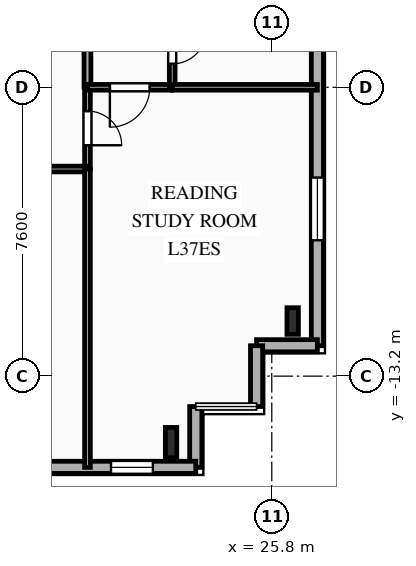
"""IFC4 building model, lengths in metres.
Left out: names, types, materials, properties, quantities, classifications, styles, units other than length and angle.
Written with IfcOpenShell. Run it as: python <this file> out.ifc"""

import sys

from ifc_helpers import new_model, si_unit, direction, frame, frame_2d, origin, origin_2d, place, context, subcontext, project, spatial, rectangle, i_section, extrude, element, fill, save


model = new_model("IFC4")
c1 = context("Model", 3, precision=1e-05, world=origin(), true_north=direction((0.0, 1.0)))
c2 = subcontext(c1, "Body", "Model", "MODEL_VIEW")
j1 = project(units=[si_unit("LENGTHUNIT", "METRE"), si_unit("PLANEANGLEUNIT", "RADIAN")], contexts=[c1])
p1 = place(None, origin())
s1 = spatial("IfcSite", under=j1, at=p1, CompositionType="ELEMENT")
p2 = place(p1, origin())
s2 = spatial("IfcBuilding", under=s1, at=p2, CompositionType="ELEMENT")
p3 = place(p2, frame((0.0, 0.0, 134.35)))
s3 = spatial("IfcBuildingStorey", under=s2, at=p3, CompositionType="ELEMENT", Elevation=134.35)
p4 = place(p3, frame((23.15, -14.95, 0.0), z_axis=(0.0, 0.0, 1.0), x_axis=(1.0, 0.0, 0.0)))
e1 = element("IfcColumn", 1, at=p4, inside=s3, PredefinedType="COLUMN", context=c2, shape_type="SweptSolid", body=[
    extrude(i_section(OverallWidth=0.3, OverallDepth=0.8, WebThickness=0.018, FlangeThickness=0.033, FilletRadius=0.03, at=origin_2d()), origin(), (0.0, 0.0, 1.0), 3.35),
])
p5 = place(p3, frame((26.35, -11.75, 0.0), z_axis=(0.0, 0.0, 1.0), x_axis=(1.0, 0.0, 0.0)))
e2 = element("IfcColumn", 2, at=p5, inside=s3, PredefinedType="COLUMN", context=c2, shape_type="SweptSolid", body=[
    extrude(i_section(OverallWidth=0.3, OverallDepth=0.7, WebThickness=0.017, FlangeThickness=0.032, FilletRadius=0.027, at=origin_2d()), origin(), (0.0, 0.0, 1.0), 3.35),
])
p6 = place(p3, frame((27.0, 17.2, 0.0), z_axis=(0.0, 0.0, 1.0), x_axis=(0.0, -1.0, 0.0)))
e3 = element("IfcWall", 3, at=p6, inside=s3, PredefinedType="SOLIDWALL", context=c2, shape_type="SweptSolid", body=[
    extrude(rectangle(XDim=29.6, YDim=0.32, at=frame_2d((14.8, 0.0))), origin(), (0.0, 0.0, 1.0), 3.04),
])
p7 = place(p6, frame((3.775, 0.0, 0.85)))
e4 = element("IfcOpeningElement", 4, at=p7, cuts=e3, PredefinedType="OPENING", context=c2, shape_type="SweptSolid", body=[
    extrude(rectangle(XDim=1.65, YDim=1.85, at=frame_2d((0.825, 0.925))), frame((0.0, 0.17, 0.0), z_axis=(0.0, -1.0, 0.0), x_axis=(1.0, 0.0, 0.0)), (0.0, 0.0, 1.0), 0.34),
])
p8 = place(p6, frame((9.32, 0.0, 0.85)))
e5 = element("IfcOpeningElement", 5, at=p8, cuts=e3, PredefinedType="OPENING", context=c2, shape_type="SweptSolid", body=[
    extrude(rectangle(XDim=1.6, YDim=1.85, at=frame_2d((0.8, 0.925))), frame((0.0, 0.17, 0.0), z_axis=(0.0, -1.0, 0.0), x_axis=(1.0, 0.0, 0.0)), (0.0, 0.0, 1.0), 0.34),
])
p9 = place(p6, frame((12.2, 0.0, 0.85)))
e6 = element("IfcOpeningElement", 6, at=p9, cuts=e3, PredefinedType="OPENING", context=c2, shape_type="SweptSolid", body=[
    extrude(rectangle(XDim=1.6, YDim=1.85, at=frame_2d((0.8, 0.925))), frame((0.0, 0.17, 0.0), z_axis=(0.0, -1.0, 0.0), x_axis=(1.0, 0.0, 0.0)), (0.0, 0.0, 1.0), 0.34),
])
p10 = place(p6, frame((15.0, 0.0, 0.85)))
e7 = element("IfcOpeningElement", 7, at=p10, cuts=e3, PredefinedType="OPENING", context=c2, shape_type="SweptSolid", body=[
    extrude(rectangle(XDim=1.6, YDim=1.85, at=frame_2d((0.8, 0.925))), frame((0.0, 0.17, 0.0), z_axis=(0.0, -1.0, 0.0), x_axis=(1.0, 0.0, 0.0)), (0.0, 0.0, 1.0), 0.34),
])
p11 = place(p6, frame((17.865, 0.0, 0.85)))
e8 = element("IfcOpeningElement", 8, at=p11, cuts=e3, PredefinedType="OPENING", context=c2, shape_type="SweptSolid", body=[
    extrude(rectangle(XDim=1.95, YDim=1.85, at=frame_2d((0.975, 0.925))), frame((0.0, 0.17, 0.0), z_axis=(0.0, -1.0, 0.0), x_axis=(1.0, 0.0, 0.0)), (0.0, 0.0, 1.0), 0.34),
])
p12 = place(p6, frame((25.175, 0.0, 0.85)))
e9 = element("IfcOpeningElement", 9, at=p12, cuts=e3, PredefinedType="OPENING", context=c2, shape_type="SweptSolid", body=[
    extrude(rectangle(XDim=1.65, YDim=1.85, at=frame_2d((0.825, 0.925))), frame((0.0, 0.17, 0.0), z_axis=(0.0, -1.0, 0.0), x_axis=(1.0, 0.0, 0.0)), (0.0, 0.0, 1.0), 0.34),
])
for number, where, z_axis, x_axis in (
    (10, (27.0, -12.4, 0.0), (0.0, 0.0, 1.0), (-1.0, 0.0, 0.0)),
    (11, (25.4, -12.4, 0.0), (0.0, 0.0, 1.0), (0.0, -1.0, 0.0)),
    (12, (23.8, -14.0, 0.0), (0.0, 0.0, 1.0), (0.0, -1.0, 0.0)),
):
    element("IfcWall", number, at=place(p3, frame(where, z_axis=z_axis, x_axis=x_axis)), inside=s3, PredefinedType="SOLIDWALL", context=c2, shape_type="SweptSolid", body=[
        extrude(rectangle(XDim=1.6, YDim=0.32, at=frame_2d((0.8, 0.0))), origin(), (0.0, 0.0, 1.0), 3.04),
    ])
p13 = place(p3, frame((23.8, -15.6, 0.0), z_axis=(0.0, 0.0, 1.0), x_axis=(-1.0, 0.0, 0.0)))
e13 = element("IfcWall", 13, at=p13, inside=s3, PredefinedType="SOLIDWALL", context=c2, shape_type="SweptSolid", body=[
    extrude(rectangle(XDim=49.6, YDim=0.32, at=frame_2d((24.8, 0.0))), origin(), (0.0, 0.0, 1.0), 3.04),
])
p14 = place(p13, frame((1.13, 0.0, 0.85)))
e14 = element("IfcOpeningElement", 14, at=p14, cuts=e13, PredefinedType="OPENING", context=c2, shape_type="SweptSolid", body=[
    extrude(rectangle(XDim=1.1, YDim=1.85, at=frame_2d((0.55, 0.925))), frame((0.0, 0.17, 0.0), z_axis=(0.0, -1.0, 0.0), x_axis=(1.0, 0.0, 0.0)), (0.0, 0.0, 1.0), 0.34),
])
p15 = place(p13, frame((6.495, 0.0, 0.85)))
e15 = element("IfcOpeningElement", 15, at=p15, cuts=e13, PredefinedType="OPENING", context=c2, shape_type="SweptSolid", body=[
    extrude(rectangle(XDim=1.65, YDim=1.85, at=frame_2d((0.825, 0.925))), frame((0.0, 0.17, 0.0), z_axis=(0.0, -1.0, 0.0), x_axis=(1.0, 0.0, 0.0)), (0.0, 0.0, 1.0), 0.34),
])
p16 = place(p13, frame((13.996, 0.0, 0.85)))
e16 = element("IfcOpeningElement", 16, at=p16, cuts=e13, PredefinedType="OPENING", context=c2, shape_type="SweptSolid", body=[
    extrude(rectangle(XDim=2.2, YDim=1.85, at=frame_2d((1.1, 0.925))), frame((0.0, 0.17, 0.0), z_axis=(0.0, -1.0, 0.0), x_axis=(1.0, 0.0, 0.0)), (0.0, 0.0, 1.0), 0.34),
])
p17 = place(p13, frame((22.396, 0.0, 0.85)))
e17 = element("IfcOpeningElement", 17, at=p17, cuts=e13, PredefinedType="OPENING", context=c2, shape_type="SweptSolid", body=[
    extrude(rectangle(XDim=2.2, YDim=1.85, at=frame_2d((1.1, 0.925))), frame((0.0, 0.17, 0.0), z_axis=(0.0, -1.0, 0.0), x_axis=(1.0, 0.0, 0.0)), (0.0, 0.0, 1.0), 0.34),
])
p18 = place(p13, frame((30.2, 0.0, 0.85)))
e18 = element("IfcOpeningElement", 18, at=p18, cuts=e13, PredefinedType="OPENING", context=c2, shape_type="SweptSolid", body=[
    extrude(rectangle(XDim=2.2, YDim=1.85, at=frame_2d((1.1, 0.925))), frame((0.0, 0.17, 0.0), z_axis=(0.0, -1.0, 0.0), x_axis=(1.0, 0.0, 0.0)), (0.0, 0.0, 1.0), 0.34),
])
p19 = place(p13, frame((38.673, 0.0, 0.85)))
e19 = element("IfcOpeningElement", 19, at=p19, cuts=e13, PredefinedType="OPENING", context=c2, shape_type="SweptSolid", body=[
    extrude(rectangle(XDim=1.65, YDim=1.85, at=frame_2d((0.825, 0.925))), frame((0.0, 0.17, 0.0), z_axis=(0.0, -1.0, 0.0), x_axis=(1.0, 0.0, 0.0)), (0.0, 0.0, 1.0), 0.34),
])
p20 = place(p13, frame((46.175, 0.0, 0.85)))
e20 = element("IfcOpeningElement", 20, at=p20, cuts=e13, PredefinedType="OPENING", context=c2, shape_type="SweptSolid", body=[
    extrude(rectangle(XDim=1.65, YDim=1.85, at=frame_2d((0.825, 0.925))), frame((0.0, 0.17, 0.0), z_axis=(0.0, -1.0, 0.0), x_axis=(1.0, 0.0, 0.0)), (0.0, 0.0, 1.0), 0.34),
])
p21 = place(p3, frame((20.95, -5.6, 0.0), z_axis=(0.0, 0.0, 1.0), x_axis=(0.0, -1.0, 0.0)))
e21 = element("IfcWall", 21, at=p21, inside=s3, PredefinedType="PARTITIONING", context=c2, shape_type="SweptSolid", body=[
    extrude(rectangle(XDim=2.15, YDim=0.15, at=frame_2d((1.075, 0.0))), origin(), (0.0, 0.0, 1.0), 3.04),
])
p22 = place(p21, frame((0.625, 0.0, 0.0)))
e22 = element("IfcOpeningElement", 22, at=p22, cuts=e21, PredefinedType="OPENING", context=c2, shape_type="SweptSolid", body=[
    extrude(rectangle(XDim=0.9, YDim=2.1, at=frame_2d((0.45, 1.05))), frame((0.0, 0.085, 0.0), z_axis=(0.0, -1.0, 0.0), x_axis=(1.0, 0.0, 0.0)), (0.0, 0.0, 1.0), 0.17),
])
p23 = place(p3, frame((20.95, -7.75, 0.0), z_axis=(0.0, 0.0, 1.0), x_axis=(-1.0, 0.0, 0.0)))
e23 = element("IfcWall", 23, at=p23, inside=s3, PredefinedType="PARTITIONING", context=c2, shape_type="SweptSolid", body=[
    extrude(rectangle(XDim=8.88, YDim=0.15, at=frame_2d((4.44, 0.0))), origin(), (0.0, 0.0, 1.0), 3.04),
])
p24 = place(p23, frame((6.416, 0.0, 0.0)))
e24 = element("IfcOpeningElement", 24, at=p24, cuts=e23, PredefinedType="OPENING", context=c2, shape_type="SweptSolid", body=[
    extrude(rectangle(XDim=1.05, YDim=2.15, at=frame_2d((0.525, 1.075))), frame((0.0, 0.085, 0.0), z_axis=(0.0, -1.0, 0.0), x_axis=(1.0, 0.0, 0.0)), (0.0, 0.0, 1.0), 0.17),
])
p25 = place(p3, frame((20.95, 8.5, 0.0), z_axis=(0.0, 0.0, 1.0), x_axis=(0.0, -1.0, 0.0)))
e25 = element("IfcWall", 25, at=p25, inside=s3, PredefinedType="PARTITIONING", context=c2, shape_type="SweptSolid", body=[
    extrude(rectangle(XDim=14.1, YDim=0.18, at=frame_2d((7.05, 0.0))), origin(), (0.0, 0.0, 1.0), 3.04),
])
p26 = place(p25, frame((8.042, 0.0, 0.0)))
e26 = element("IfcOpeningElement", 26, at=p26, cuts=e25, PredefinedType="OPENING", context=c2, shape_type="SweptSolid", body=[
    extrude(rectangle(XDim=1.0, YDim=2.15, at=frame_2d((0.5, 1.075))), frame((0.0, 0.1, 0.0), z_axis=(0.0, -1.0, 0.0), x_axis=(1.0, 0.0, 0.0)), (0.0, 0.0, 1.0), 0.2),
])
p27 = place(p3, frame((23.18, -5.6, 0.0), z_axis=(0.0, 0.0, 1.0), x_axis=(-1.0, 0.0, 0.0)))
e27 = element("IfcWall", 27, at=p27, inside=s3, PredefinedType="PARTITIONING", context=c2, shape_type="SweptSolid", body=[
    extrude(rectangle(XDim=2.23, YDim=0.15, at=frame_2d((1.115, 0.0))), origin(), (0.0, 0.0, 1.0), 3.04),
])
p28 = place(p27, frame((0.59, 0.0, 0.0)))
e28 = element("IfcOpeningElement", 28, at=p28, cuts=e27, PredefinedType="OPENING", context=c2, shape_type="SweptSolid", body=[
    extrude(rectangle(XDim=1.05, YDim=2.15, at=frame_2d((0.525, 1.075))), frame((0.0, 0.085, 0.0), z_axis=(0.0, -1.0, 0.0), x_axis=(1.0, 0.0, 0.0)), (0.0, 0.0, 1.0), 0.17),
])
p29 = place(p3, frame((23.18, -3.25, 0.0), z_axis=(0.0, 0.0, 1.0), x_axis=(0.0, -1.0, 0.0)))
e29 = element("IfcWall", 29, at=p29, inside=s3, PredefinedType="PLUMBINGWALL", context=c2, shape_type="SweptSolid", body=[
    extrude(rectangle(XDim=2.35, YDim=0.15, at=frame_2d((1.175, 0.0))), origin(), (0.0, 0.0, 1.0), 3.04),
])
p30 = place(p29, frame((0.834, 0.0, 0.0)))
e30 = element("IfcOpeningElement", 30, at=p30, cuts=e29, PredefinedType="OPENING", context=c2, shape_type="SweptSolid", body=[
    extrude(rectangle(XDim=0.9, YDim=2.1, at=frame_2d((0.45, 1.05))), frame((0.0, 0.085, 0.0), z_axis=(0.0, -1.0, 0.0), x_axis=(1.0, 0.0, 0.0)), (0.0, 0.0, 1.0), 0.17),
])
p31 = place(p3, frame((23.18, -5.6, 0.0), z_axis=(0.0, 0.0, 1.0), x_axis=(1.0, 0.0, 0.0)))
e31 = element("IfcWall", 31, at=p31, inside=s3, PredefinedType="PLUMBINGWALL", context=c2, shape_type="SweptSolid", body=[
    extrude(rectangle(XDim=3.82, YDim=0.15, at=frame_2d((1.91, 0.0))), origin(), (0.0, 0.0, 1.0), 3.04),
])
p32 = place(p3, frame((20.95, -15.6, 0.0), z_axis=(0.0, 0.0, 1.0), x_axis=(0.0, 1.0, 0.0)))
e32 = element("IfcWall", 32, at=p32, inside=s3, PredefinedType="PARTITIONING", context=c2, shape_type="SweptSolid", body=[
    extrude(rectangle(XDim=7.85, YDim=0.15, at=frame_2d((3.925, 0.0))), origin(), (0.0, 0.0, 1.0), 3.04),
])
p33 = place(p12, origin())
e33 = element("IfcWindow", 33, at=p33, inside=s3, PartitioningType="SINGLE_PANEL", PredefinedType="WINDOW", context=c2, shape_type="SweptSolid", body=[
    extrude(rectangle(XDim=1.65, YDim=1.85, at=frame_2d((0.825, 0.925))), frame((0.0, 0.03, 0.0), z_axis=(0.0, -1.0, 0.0), x_axis=(1.0, 0.0, 0.0)), (0.0, 0.0, 1.0), 0.06),
])
fill(e9, e33)
p34 = place(p14, origin())
e34 = element("IfcWindow", 34, at=p34, inside=s3, PartitioningType="SINGLE_PANEL", PredefinedType="WINDOW", context=c2, shape_type="SweptSolid", body=[
    extrude(rectangle(XDim=1.1, YDim=1.85, at=frame_2d((0.55, 0.925))), frame((0.0, 0.03, 0.0), z_axis=(0.0, -1.0, 0.0), x_axis=(1.0, 0.0, 0.0)), (0.0, 0.0, 1.0), 0.06),
])
fill(e14, e34)
p35 = place(p22, origin())
e35 = element("IfcDoor", 35, at=p35, inside=s3, OperationType="SINGLE_SWING_RIGHT", PredefinedType="DOOR", context=c2, shape_type="SweptSolid", body=[
    extrude(rectangle(XDim=0.9, YDim=2.1, at=frame_2d((0.45, 1.05))), frame((0.0, 0.025, 0.0), z_axis=(0.0, -1.0, 0.0), x_axis=(1.0, 0.0, 0.0)), (0.0, 0.0, 1.0), 0.05),
])
fill(e22, e35)
p36 = place(p28, origin())
e36 = element("IfcDoor", 36, at=p36, inside=s3, OperationType="SINGLE_SWING_RIGHT", PredefinedType="DOOR", context=c2, shape_type="SweptSolid", body=[
    extrude(rectangle(XDim=1.05, YDim=2.15, at=frame_2d((0.525, 1.075))), frame((0.0, 0.025, 0.0), z_axis=(0.0, -1.0, 0.0), x_axis=(1.0, 0.0, 0.0)), (0.0, 0.0, 1.0), 0.05),
])
fill(e28, e36)
p37 = place(p30, origin())
e37 = element("IfcDoor", 37, at=p37, inside=s3, OperationType="SINGLE_SWING_LEFT", PredefinedType="DOOR", context=c2, shape_type="SweptSolid", body=[
    extrude(rectangle(XDim=0.9, YDim=2.1, at=frame_2d((0.45, 1.05))), frame((0.0, 0.025, 0.0), z_axis=(0.0, -1.0, 0.0), x_axis=(1.0, 0.0, 0.0)), (0.0, 0.0, 1.0), 0.05),
])
fill(e30, e37)
save(model, sys.argv[1])
